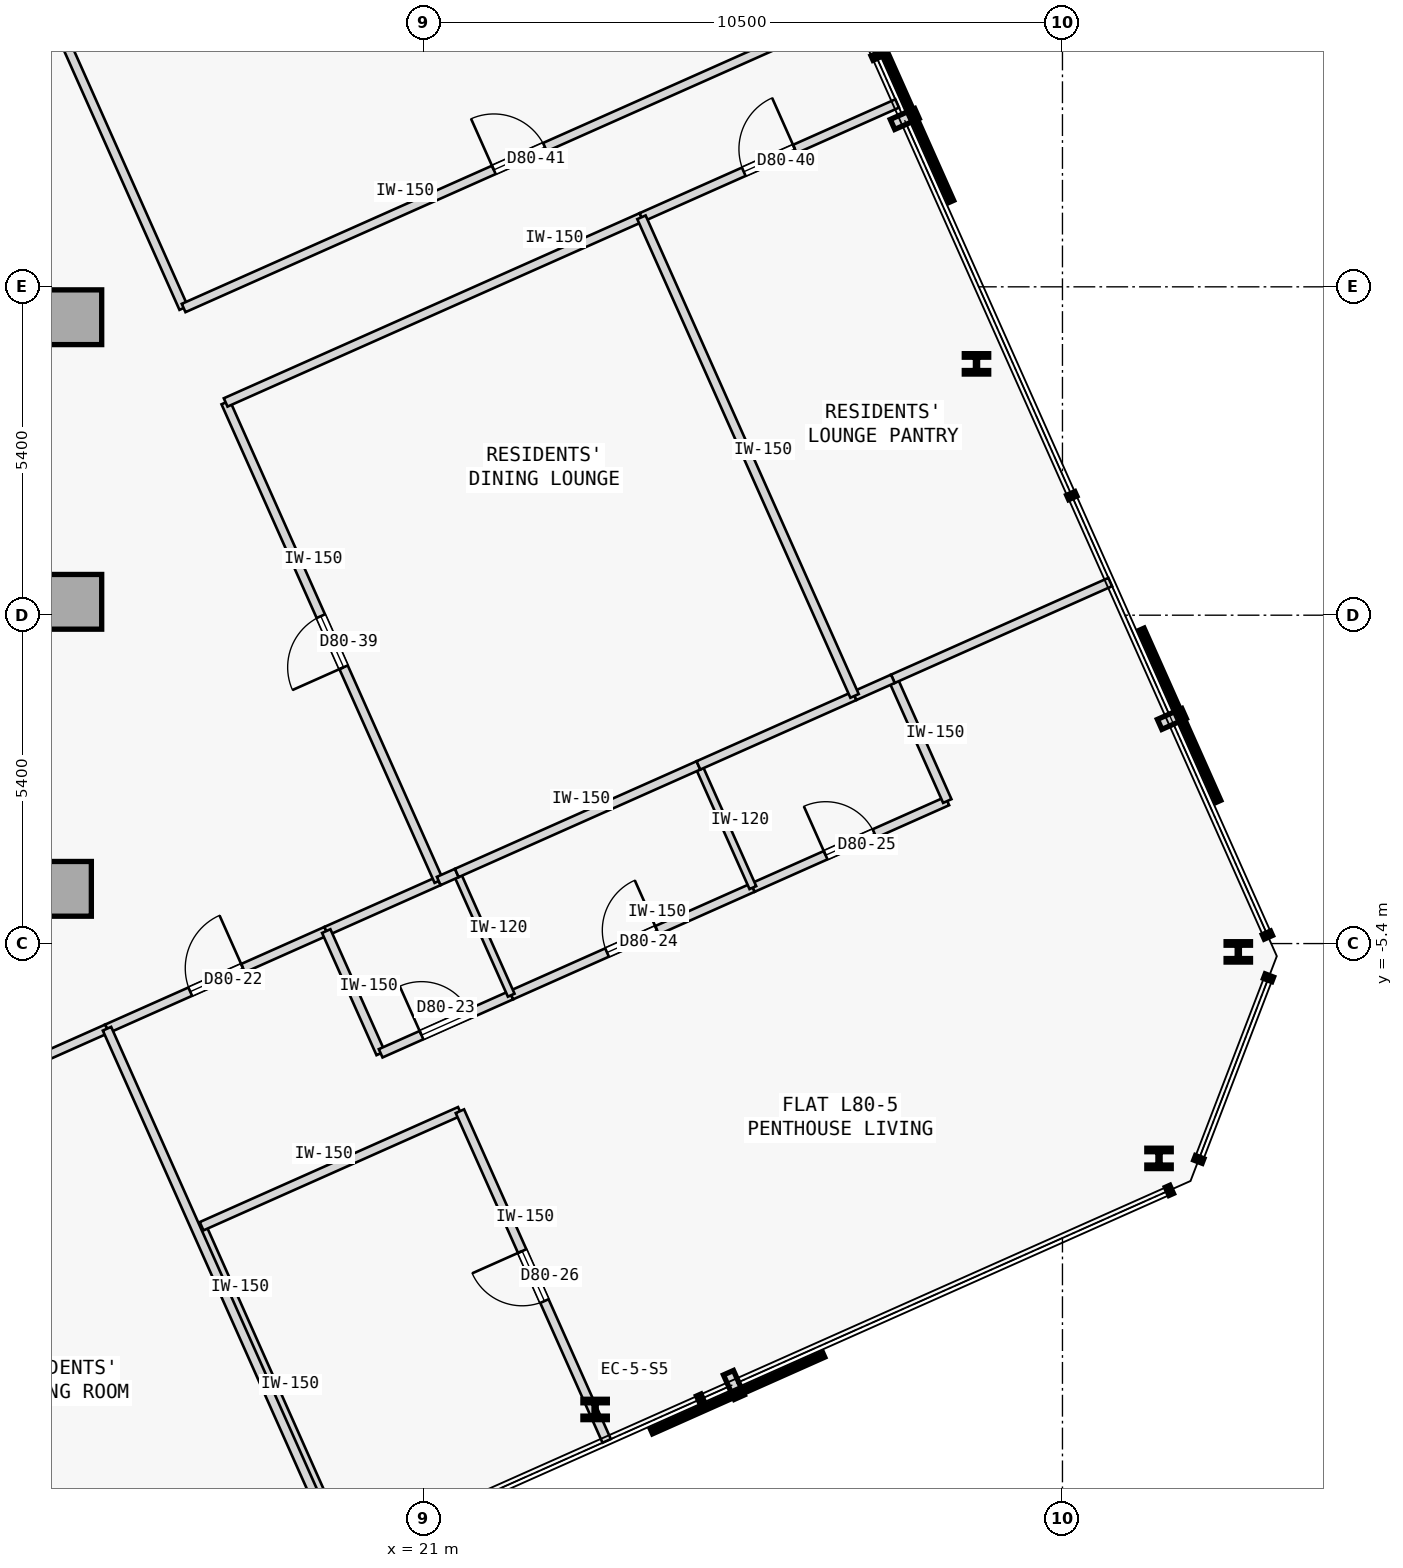
"""IFC4 building model, lengths in metres.
Left out: names, types, materials, properties, quantities, classifications, styles, units other than length and angle.
Written with IfcOpenShell. Run it as: python <this file> out.ifc"""

import sys

from ifc_helpers import new_model, si_unit, direction, frame, frame_2d, origin, origin_2d, place, context, subcontext, project, spatial, rectangle, i_section, extrude, element, fill, save


model = new_model("IFC4")
c1 = context("Model", 3, precision=1e-05, world=origin(), true_north=direction((0.0, 1.0)))
c2 = subcontext(c1, "Body", "Model", "MODEL_VIEW")
j1 = project(units=[si_unit("LENGTHUNIT", "METRE"), si_unit("PLANEANGLEUNIT", "RADIAN")], contexts=[c1])
p1 = place(None, origin())
s1 = spatial("IfcSite", under=j1, at=p1, CompositionType="ELEMENT")
p2 = place(p1, origin())
s2 = spatial("IfcBuilding", under=s1, at=p2, CompositionType="ELEMENT")
p3 = place(p2, frame((0.0, 0.0, 298.65)))
s3 = spatial("IfcBuildingStorey", under=s2, at=p3, CompositionType="ELEMENT", Elevation=298.65)
for number, where, z_axis, x_axis in (
    (1, (15.25, 4.9, 0.0), (0.0, 0.0, 1.0), (1.0, 0.0, 0.0)),
    (2, (15.25, 0.22, 0.0), (0.0, 0.0, 1.0), (1.0, 0.0, 0.0)),
    (3, (15.08, -4.5, 0.0), (0.0, 0.0, 1.0), (1.0, 0.0, 0.0)),
):
    element("IfcColumn", number, at=place(p3, frame(where, z_axis=z_axis, x_axis=x_axis)), inside=s3, PredefinedType="COLUMN", context=c2, shape_type="SweptSolid", body=[
        extrude(rectangle(XDim=0.9, YDim=0.9, at=origin_2d()), origin(), (0.0, 0.0, 1.0), 3.35),
    ])
for number, where, z_axis, x_axis in (
    (4, (23.814, -13.062, 0.0), (0.0, 0.0, 1.0), (1.0, 0.0, 0.0)),
    (5, (33.088, -8.933, 0.0), (0.0, 0.0, 1.0), (1.0, 0.0, 0.0)),
    (6, (34.392, -5.537, 0.0), (0.0, 0.0, 1.0), (1.0, 0.0, 0.0)),
    (7, (30.086, 4.133, 0.0), (0.0, 0.0, 1.0), (1.0, 0.0, 0.0)),
):
    element("IfcColumn", number, at=place(p3, frame(where, z_axis=z_axis, x_axis=x_axis)), inside=s3, PredefinedType="COLUMN", context=c2, shape_type="SweptSolid", body=[
        extrude(i_section(OverallWidth=0.401, OverallDepth=0.335, WebThickness=0.036, FlangeThickness=0.058, FilletRadius=0.015, at=origin_2d()), origin(), (0.0, 0.0, 1.0), 3.35),
    ])
p4 = place(p3, frame((15.787, -6.8, 0.0), z_axis=(0.0, 0.0, 1.0), x_axis=(0.913558844356, 0.406706574693, 0.0)))
e8 = element("IfcWall", 8, at=p4, inside=s3, PredefinedType="PARTITIONING", context=c2, shape_type="SweptSolid", body=[
    extrude(rectangle(XDim=3.947, YDim=0.15, at=frame_2d((1.973, 0.0))), origin(), (0.0, 0.0, 1.0), 3.125),
])
p5 = place(p4, frame((1.499, 0.0, 0.0)))
e9 = element("IfcOpeningElement", 9, at=p5, cuts=e8, PredefinedType="OPENING", context=c2, shape_type="SweptSolid", body=[
    extrude(rectangle(XDim=0.95, YDim=2.15, at=frame_2d((0.475, 1.075))), frame((0.0, 0.085, 0.0), z_axis=(0.0, -1.0, 0.0), x_axis=(1.0, 0.0, 0.0)), (0.0, 0.0, 1.0), 0.17),
])
p6 = place(p3, frame((19.393, -5.195, 0.0), z_axis=(0.0, 0.0, 1.0), x_axis=(0.91354290336, 0.406742380039, 0.0)))
e10 = element("IfcWall", 10, at=p6, inside=s3, PredefinedType="PARTITIONING", context=c2, shape_type="SweptSolid", body=[
    extrude(rectangle(XDim=2.025, YDim=0.15, at=frame_2d((1.013, 0.0))), origin(), (0.0, 0.0, 1.0), 3.125),
])
p7 = place(p3, frame((10.18, -9.297, 0.0), z_axis=(0.0, 0.0, 1.0), x_axis=(0.913545641557, 0.406736229997, 0.0)))
e11 = element("IfcWall", 11, at=p7, inside=s3, PredefinedType="PARTITIONING", context=c2, shape_type="SweptSolid", body=[
    extrude(rectangle(XDim=6.138, YDim=0.15, at=frame_2d((3.069, 0.0))), origin(), (0.0, 0.0, 1.0), 3.125),
])
p8 = place(p7, frame((2.609, 0.0, 0.0)))
e12 = element("IfcOpeningElement", 12, at=p8, cuts=e11, PredefinedType="OPENING", context=c2, shape_type="SweptSolid", body=[
    extrude(rectangle(XDim=0.92, YDim=2.15, at=frame_2d((0.46, 1.075))), frame((0.0, 0.085, 0.0), z_axis=(0.0, -1.0, 0.0), x_axis=(1.0, 0.0, 0.0)), (0.0, 0.0, 1.0), 0.17),
])
p9 = place(p3, frame((21.243, -4.371, 0.0), z_axis=(0.0, 0.0, 1.0), x_axis=(-0.406751025101, 0.913539054217, 0.0)))
e13 = element("IfcWall", 13, at=p9, inside=s3, PredefinedType="PARTITIONING", context=c2, shape_type="SweptSolid", body=[
    extrude(rectangle(XDim=8.615, YDim=0.15, at=frame_2d((4.308, 0.0))), origin(), (0.0, 0.0, 1.0), 3.125),
])
p10 = place(p9, frame((3.847, 0.0, 0.0)))
e14 = element("IfcOpeningElement", 14, at=p10, cuts=e13, PredefinedType="OPENING", context=c2, shape_type="SweptSolid", body=[
    extrude(rectangle(XDim=0.92, YDim=2.15, at=frame_2d((0.46, 1.075))), frame((0.0, 0.085, 0.0), z_axis=(0.0, -1.0, 0.0), x_axis=(1.0, 0.0, 0.0)), (0.0, 0.0, 1.0), 0.17),
])
p11 = place(p3, frame((17.739, 3.499, 0.0), z_axis=(0.0, 0.0, 1.0), x_axis=(0.913545033673, 0.406737595326, 0.0)))
e15 = element("IfcWall", 15, at=p11, inside=s3, PredefinedType="PARTITIONING", context=c2, shape_type="SweptSolid", body=[
    extrude(rectangle(XDim=7.485, YDim=0.15, at=frame_2d((3.743, 0.0))), origin(), (0.0, 0.0, 1.0), 3.125),
])
p12 = place(p3, frame((24.577, 6.543, 0.0), z_axis=(0.0, 0.0, 1.0), x_axis=(0.913537946403, 0.406753513177, 0.0)))
e16 = element("IfcWall", 16, at=p12, inside=s3, PredefinedType="PARTITIONING", context=c2, shape_type="SweptSolid", body=[
    extrude(rectangle(XDim=4.603, YDim=0.15, at=frame_2d((2.302, 0.0))), origin(), (0.0, 0.0, 1.0), 3.125),
])
p13 = place(p12, frame((1.842, 0.0, 0.0)))
e17 = element("IfcOpeningElement", 17, at=p13, cuts=e16, PredefinedType="OPENING", context=c2, shape_type="SweptSolid", body=[
    extrude(rectangle(XDim=0.92, YDim=2.15, at=frame_2d((0.46, 1.075))), frame((0.0, 0.085, 0.0), z_axis=(0.0, -1.0, 0.0), x_axis=(1.0, 0.0, 0.0)), (0.0, 0.0, 1.0), 0.17),
])
p14 = place(p3, frame((17.047, 5.052, 0.0), z_axis=(0.0, 0.0, 1.0), x_axis=(-0.406752543172, 0.913538378298, 0.0)))
e18 = element("IfcWall", 18, at=p14, inside=s3, PredefinedType="PARTITIONING", context=c2, shape_type="SweptSolid", body=[
    extrude(rectangle(XDim=7.561, YDim=0.15, at=frame_2d((3.781, 0.0))), origin(), (0.0, 0.0, 1.0), 3.125),
])
p15 = place(p3, frame((17.047, 5.052, 0.0), z_axis=(0.0, 0.0, 1.0), x_axis=(0.913549839503, 0.406726801113, 0.0)))
e19 = element("IfcWall", 19, at=p15, inside=s3, PredefinedType="PARTITIONING", context=c2, shape_type="SweptSolid", body=[
    extrude(rectangle(XDim=12.088, YDim=0.15, at=frame_2d((6.044, 0.0))), origin(), (0.0, 0.0, 1.0), 3.125),
])
p16 = place(p15, frame((5.584, 0.0, 0.0)))
e20 = element("IfcOpeningElement", 20, at=p16, cuts=e19, PredefinedType="OPENING", context=c2, shape_type="SweptSolid", body=[
    extrude(rectangle(XDim=0.92, YDim=2.15, at=frame_2d((0.46, 1.075))), frame((0.0, 0.085, 0.0), z_axis=(0.0, -1.0, 0.0), x_axis=(1.0, 0.0, 0.0)), (0.0, 0.0, 1.0), 0.17),
])
p17 = place(p3, frame((20.288, -7.205, 0.0), z_axis=(0.0, 0.0, 1.0), x_axis=(-0.406817905151, 0.913509273105, 0.0)))
e21 = element("IfcWall", 21, at=p17, inside=s3, PredefinedType="PARTITIONING", context=c2, shape_type="SweptSolid", body=[
    extrude(rectangle(XDim=2.2, YDim=0.15, at=frame_2d((1.1, 0.0))), origin(), (0.0, 0.0, 1.0), 3.125),
])
p18 = place(p3, frame((20.288, -7.205, 0.0), z_axis=(0.0, 0.0, 1.0), x_axis=(0.913541436194, 0.406745675276, 0.0)))
e22 = element("IfcWall", 22, at=p18, inside=s3, PredefinedType="PARTITIONING", context=c2, shape_type="SweptSolid", body=[
    extrude(rectangle(XDim=2.35, YDim=0.15, at=frame_2d((1.175, 0.0))), origin(), (0.0, 0.0, 1.0), 3.125),
])
p19 = place(p18, frame((0.735, 0.0, 0.0)))
e23 = element("IfcOpeningElement", 23, at=p19, cuts=e22, PredefinedType="OPENING", context=c2, shape_type="SweptSolid", body=[
    extrude(rectangle(XDim=0.88, YDim=2.15, at=frame_2d((0.44, 1.075))), frame((0.0, 0.085, 0.0), z_axis=(0.0, -1.0, 0.0), x_axis=(1.0, 0.0, 0.0)), (0.0, 0.0, 1.0), 0.17),
])
p20 = place(p3, frame((22.435, -6.249, 0.0), z_axis=(0.0, 0.0, 1.0), x_axis=(0.913545193015, 0.406737237438, 0.0)))
e24 = element("IfcWall", 24, at=p20, inside=s3, PredefinedType="PARTITIONING", context=c2, shape_type="SweptSolid", body=[
    extrude(rectangle(XDim=4.35, YDim=0.15, at=frame_2d((2.175, 0.0))), origin(), (0.0, 0.0, 1.0), 3.125),
])
p21 = place(p20, frame((1.725, 0.0, 0.0)))
e25 = element("IfcOpeningElement", 25, at=p21, cuts=e24, PredefinedType="OPENING", context=c2, shape_type="SweptSolid", body=[
    extrude(rectangle(XDim=0.9, YDim=2.15, at=frame_2d((0.45, 1.075))), frame((0.0, 0.085, 0.0), z_axis=(0.0, -1.0, 0.0), x_axis=(1.0, 0.0, 0.0)), (0.0, 0.0, 1.0), 0.17),
])
p22 = place(p3, frame((26.408, -4.48, 0.0), z_axis=(0.0, 0.0, 1.0), x_axis=(0.913549606868, 0.406727323635, 0.0)))
e26 = element("IfcWall", 26, at=p22, inside=s3, PredefinedType="PARTITIONING", context=c2, shape_type="SweptSolid", body=[
    extrude(rectangle(XDim=3.5, YDim=0.15, at=frame_2d((1.75, 0.0))), origin(), (0.0, 0.0, 1.0), 3.125),
])
p23 = place(p22, frame((1.31, 0.0, 0.0)))
e27 = element("IfcOpeningElement", 27, at=p23, cuts=e26, PredefinedType="OPENING", context=c2, shape_type="SweptSolid", body=[
    extrude(rectangle(XDim=0.88, YDim=2.15, at=frame_2d((0.44, 1.075))), frame((0.0, 0.085, 0.0), z_axis=(0.0, -1.0, 0.0), x_axis=(1.0, 0.0, 0.0)), (0.0, 0.0, 1.0), 0.17),
])
p24 = place(p3, frame((29.606, -3.056, 0.0), z_axis=(0.0, 0.0, 1.0), x_axis=(-0.406725294076, 0.913550510459, 0.0)))
e28 = element("IfcWall", 28, at=p24, inside=s3, PredefinedType="PARTITIONING", context=c2, shape_type="SweptSolid", body=[
    extrude(rectangle(XDim=2.2, YDim=0.15, at=frame_2d((1.1, 0.0))), origin(), (0.0, 0.0, 1.0), 3.125),
])
p25 = place(p3, frame((19.757, -15.47, 0.0), z_axis=(0.0, 0.0, 1.0), x_axis=(-0.406749048544, 0.913539934271, 0.0)))
e29 = element("IfcWall", 29, at=p25, inside=s3, PredefinedType="PARTITIONING", context=c2, shape_type="SweptSolid", body=[
    extrude(rectangle(XDim=5.935, YDim=0.15, at=frame_2d((2.968, 0.0))), origin(), (0.0, 0.0, 1.0), 3.125),
])
p26 = place(p3, frame((17.343, -10.049, 0.0), z_axis=(0.0, 0.0, 1.0), x_axis=(0.913525541207, 0.406781373176, 0.0)))
e30 = element("IfcWall", 30, at=p26, inside=s3, PredefinedType="PARTITIONING", context=c2, shape_type="SweptSolid", body=[
    extrude(rectangle(XDim=4.65, YDim=0.15, at=frame_2d((2.325, 0.0))), origin(), (0.0, 0.0, 1.0), 3.125),
])
p27 = place(p3, frame((24.005, -13.579, 0.0), z_axis=(0.0, 0.0, 1.0), x_axis=(-0.406733763825, 0.913546739562, 0.0)))
e31 = element("IfcWall", 31, at=p27, inside=s3, PredefinedType="PARTITIONING", context=c2, shape_type="SweptSolid", body=[
    extrude(rectangle(XDim=5.935, YDim=0.15, at=frame_2d((2.968, 0.0))), origin(), (0.0, 0.0, 1.0), 3.125),
])
p28 = place(p27, frame((2.518, 0.0, 0.0)))
e32 = element("IfcOpeningElement", 32, at=p28, cuts=e31, PredefinedType="OPENING", context=c2, shape_type="SweptSolid", body=[
    extrude(rectangle(XDim=0.9, YDim=2.15, at=frame_2d((0.45, 1.075))), frame((0.0, 0.085, 0.0), z_axis=(0.0, -1.0, 0.0), x_axis=(1.0, 0.0, 0.0)), (0.0, 0.0, 1.0), 0.17),
])
p29 = place(p3, frame((19.665, -15.511, 0.0), z_axis=(0.0, 0.0, 1.0), x_axis=(-0.406729927653, 0.913548447512, 0.0)))
e33 = element("IfcWall", 33, at=p29, inside=s3, PredefinedType="PARTITIONING", context=c2, shape_type="SweptSolid", body=[
    extrude(rectangle(XDim=9.535, YDim=0.15, at=frame_2d((4.768, 0.0))), origin(), (0.0, 0.0, 1.0), 3.125),
])
p30 = place(p3, frame((28.711, -1.046, 0.0), z_axis=(0.0, 0.0, 1.0), x_axis=(0.913523164096, 0.406786711508, 0.0)))
e34 = element("IfcWall", 34, at=p30, inside=s3, PredefinedType="PARTITIONING", context=c2, shape_type="SweptSolid", body=[
    extrude(rectangle(XDim=3.913, YDim=0.15, at=frame_2d((1.957, 0.0))), origin(), (0.0, 0.0, 1.0), 3.125),
])
p31 = place(p3, frame((22.435, -6.249, 0.0), z_axis=(0.0, 0.0, 1.0), x_axis=(-0.406725294076, 0.913550510459, 0.0)))
e35 = element("IfcWall", 35, at=p31, inside=s3, PredefinedType="PARTITIONING", context=c2, shape_type="SweptSolid", body=[
    extrude(rectangle(XDim=2.2, YDim=0.12, at=frame_2d((1.1, 0.0))), origin(), (0.0, 0.0, 1.0), 3.125),
])
p32 = place(p3, frame((21.243, -4.371, 0.0), z_axis=(0.0, 0.0, 1.0), x_axis=(0.913656562077, 0.406487006648, 0.0)))
e36 = element("IfcWall", 36, at=p32, inside=s3, PredefinedType="PARTITIONING", context=c2, shape_type="SweptSolid", body=[
    extrude(rectangle(XDim=0.325, YDim=0.15, at=frame_2d((0.163, 0.0))), origin(), (0.0, 0.0, 1.0), 3.125),
])
p33 = place(p3, frame((26.408, -4.48, 0.0), z_axis=(0.0, 0.0, 1.0), x_axis=(-0.406725294076, 0.913550510459, 0.0)))
e37 = element("IfcWall", 37, at=p33, inside=s3, PredefinedType="PARTITIONING", context=c2, shape_type="SweptSolid", body=[
    extrude(rectangle(XDim=2.2, YDim=0.12, at=frame_2d((1.1, 0.0))), origin(), (0.0, 0.0, 1.0), 3.125),
])
p34 = place(p3, frame((21.54, -4.239, 0.0), z_axis=(0.0, 0.0, 1.0), x_axis=(0.913545193015, 0.406737237438, 0.0)))
e38 = element("IfcWall", 38, at=p34, inside=s3, PredefinedType="PARTITIONING", context=c2, shape_type="SweptSolid", body=[
    extrude(rectangle(XDim=4.35, YDim=0.15, at=frame_2d((2.175, 0.0))), origin(), (0.0, 0.0, 1.0), 3.125),
])
p35 = place(p3, frame((25.514, -2.47, 0.0), z_axis=(0.0, 0.0, 1.0), x_axis=(0.913531886701, 0.406767122542, 0.0)))
e39 = element("IfcWall", 39, at=p35, inside=s3, PredefinedType="PARTITIONING", context=c2, shape_type="SweptSolid", body=[
    extrude(rectangle(XDim=2.81, YDim=0.15, at=frame_2d((1.405, 0.0))), origin(), (0.0, 0.0, 1.0), 3.125),
])
p36 = place(p3, frame((28.081, -1.327, 0.0), z_axis=(0.0, 0.0, 1.0), x_axis=(0.9136217601, 0.406565221671, 0.0)))
e40 = element("IfcWall", 40, at=p36, inside=s3, PredefinedType="PARTITIONING", context=c2, shape_type="SweptSolid", body=[
    extrude(rectangle(XDim=0.69, YDim=0.15, at=frame_2d((0.345, 0.0))), origin(), (0.0, 0.0, 1.0), 3.125),
])
p37 = place(p3, frame((28.081, -1.327, 0.0), z_axis=(0.0, 0.0, 1.0), x_axis=(-0.406751025101, 0.913539054217, 0.0)))
e41 = element("IfcWall", 41, at=p37, inside=s3, PredefinedType="PARTITIONING", context=c2, shape_type="SweptSolid", body=[
    extrude(rectangle(XDim=8.615, YDim=0.15, at=frame_2d((4.308, 0.0))), origin(), (0.0, 0.0, 1.0), 3.125),
])
p38 = place(p5, origin())
e42 = element("IfcDoor", 42, at=p38, inside=s3, OperationType="SINGLE_SWING_RIGHT", PredefinedType="DOOR", context=c2, shape_type="SweptSolid", body=[
    extrude(rectangle(XDim=0.95, YDim=2.15, at=frame_2d((0.475, 1.075))), frame((0.0, 0.025, 0.0), z_axis=(0.0, -1.0, 0.0), x_axis=(1.0, 0.0, 0.0)), (0.0, 0.0, 1.0), 0.05),
])
fill(e9, e42)
p39 = place(p19, origin())
e43 = element("IfcDoor", 43, at=p39, inside=s3, OperationType="SINGLE_SWING_LEFT", PredefinedType="DOOR", context=c2, shape_type="SweptSolid", body=[
    extrude(rectangle(XDim=0.88, YDim=2.15, at=frame_2d((0.44, 1.075))), frame((0.0, 0.025, 0.0), z_axis=(0.0, -1.0, 0.0), x_axis=(1.0, 0.0, 0.0)), (0.0, 0.0, 1.0), 0.05),
])
fill(e23, e43)
p40 = place(p21, origin())
e44 = element("IfcDoor", 44, at=p40, inside=s3, OperationType="SINGLE_SWING_RIGHT", PredefinedType="DOOR", context=c2, shape_type="SweptSolid", body=[
    extrude(rectangle(XDim=0.9, YDim=2.15, at=frame_2d((0.45, 1.075))), frame((0.0, 0.025, 0.0), z_axis=(0.0, -1.0, 0.0), x_axis=(1.0, 0.0, 0.0)), (0.0, 0.0, 1.0), 0.05),
])
fill(e25, e44)
p41 = place(p23, origin())
e45 = element("IfcDoor", 45, at=p41, inside=s3, OperationType="SINGLE_SWING_LEFT", PredefinedType="DOOR", context=c2, shape_type="SweptSolid", body=[
    extrude(rectangle(XDim=0.88, YDim=2.15, at=frame_2d((0.44, 1.075))), frame((0.0, 0.025, 0.0), z_axis=(0.0, -1.0, 0.0), x_axis=(1.0, 0.0, 0.0)), (0.0, 0.0, 1.0), 0.05),
])
fill(e27, e45)
p42 = place(p28, origin())
e46 = element("IfcDoor", 46, at=p42, inside=s3, OperationType="SINGLE_SWING_RIGHT", PredefinedType="DOOR", context=c2, shape_type="SweptSolid", body=[
    extrude(rectangle(XDim=0.9, YDim=2.15, at=frame_2d((0.45, 1.075))), frame((0.0, 0.025, 0.0), z_axis=(0.0, -1.0, 0.0), x_axis=(1.0, 0.0, 0.0)), (0.0, 0.0, 1.0), 0.05),
])
fill(e32, e46)
p43 = place(p10, origin())
e47 = element("IfcDoor", 47, at=p43, inside=s3, OperationType="SINGLE_SWING_LEFT", PredefinedType="DOOR", context=c2, shape_type="SweptSolid", body=[
    extrude(rectangle(XDim=0.92, YDim=2.15, at=frame_2d((0.46, 1.075))), frame((0.0, 0.025, 0.0), z_axis=(0.0, -1.0, 0.0), x_axis=(1.0, 0.0, 0.0)), (0.0, 0.0, 1.0), 0.05),
])
fill(e14, e47)
p44 = place(p13, origin())
e48 = element("IfcDoor", 48, at=p44, inside=s3, OperationType="SINGLE_SWING_RIGHT", PredefinedType="DOOR", context=c2, shape_type="SweptSolid", body=[
    extrude(rectangle(XDim=0.92, YDim=2.15, at=frame_2d((0.46, 1.075))), frame((0.0, 0.025, 0.0), z_axis=(0.0, -1.0, 0.0), x_axis=(1.0, 0.0, 0.0)), (0.0, 0.0, 1.0), 0.05),
])
fill(e17, e48)
p45 = place(p16, origin())
e49 = element("IfcDoor", 49, at=p45, inside=s3, OperationType="SINGLE_SWING_LEFT", PredefinedType="DOOR", context=c2, shape_type="SweptSolid", body=[
    extrude(rectangle(XDim=0.92, YDim=2.15, at=frame_2d((0.46, 1.075))), frame((0.0, 0.025, 0.0), z_axis=(0.0, -1.0, 0.0), x_axis=(1.0, 0.0, 0.0)), (0.0, 0.0, 1.0), 0.05),
])
fill(e20, e49)
save(model, sys.argv[1])
